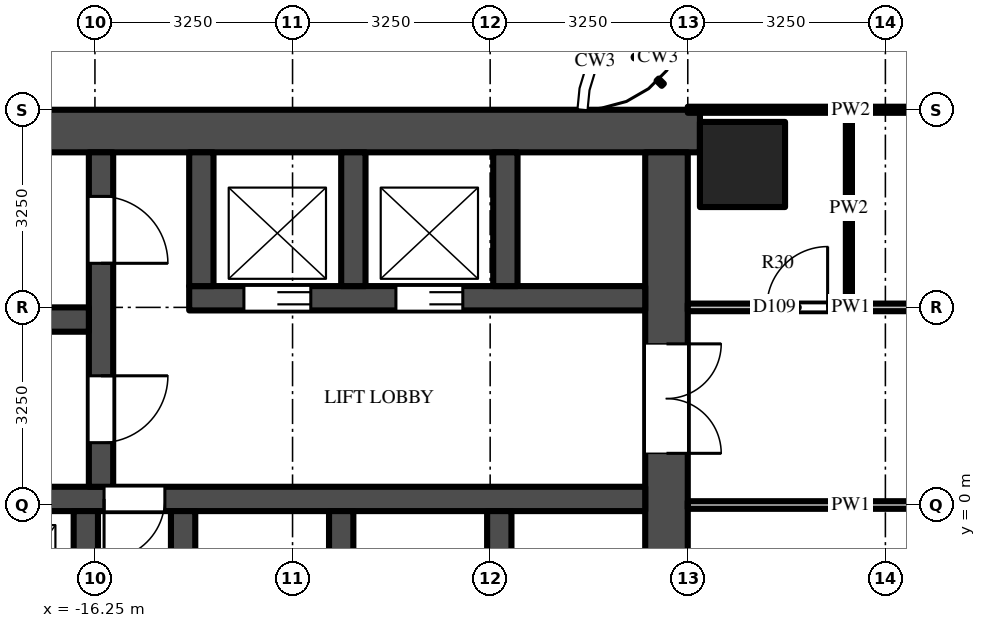
"""IFC4 building model, lengths in metres.
Left out: names, types, materials, properties, quantities, classifications, styles, units other than length and angle.
Written with IfcOpenShell. Run it as: python <this file> out.ifc"""

import sys

from ifc_helpers import new_model, si_unit, direction, frame, frame_2d, origin, origin_2d, place, context, subcontext, project, spatial, rectangle, extrude, source, transform, mapped, element, fill, save


model = new_model("IFC4")
c1 = context("Model", 3, precision=1e-05, world=origin(), true_north=direction((0.0, 1.0)))
c2 = subcontext(c1, "Body", "Model", "MODEL_VIEW")
j1 = project(units=[si_unit("LENGTHUNIT", "METRE"), si_unit("PLANEANGLEUNIT", "RADIAN")], contexts=[c1])
p1 = place(None, origin())
s1 = spatial("IfcSite", under=j1, at=p1, CompositionType="ELEMENT")
p2 = place(p1, origin())
s2 = spatial("IfcBuilding", under=s1, at=p2, CompositionType="ELEMENT")
p3 = place(p2, frame((0.0, 0.0, 70.0)))
s3 = spatial("IfcBuildingStorey", under=s2, at=p3, CompositionType="ELEMENT", Elevation=70.0)
m1 = source(origin(), c2, "Body", "SweptSolid", [
    extrude(rectangle(XDim=1.4, YDim=1.4, at=origin_2d()), origin(), (0.0, 0.0, 1.0), 4.5),
])
p4 = place(p3, frame((-5.6, 5.6, 0.0), z_axis=(0.0, 0.0, 1.0), x_axis=(1.0, 0.0, 0.0)))
e1 = element("IfcColumn", 1, at=p4, inside=s3, PredefinedType="COLUMN", context=c2, shape_type="MappedRepresentation", body=[
    mapped(m1, transform((0.0, 0.0, 0.0))),
])
m2 = source(origin(), c2, "Body", "SweptSolid", [
    extrude(rectangle(XDim=16.45, YDim=0.7, at=frame_2d((8.225, 0.0))), origin(), (0.0, 0.0, 1.0), 4.25),
])
p5 = place(p3, frame((-6.3, 6.15, 0.0), z_axis=(0.0, 0.0, 1.0), x_axis=(-1.0, 0.0, 0.0)))
e2 = element("IfcWall", 2, at=p5, inside=s3, PredefinedType="SHEAR", context=c2, shape_type="MappedRepresentation", body=[
    mapped(m2, transform((0.0, 0.0, 0.0))),
])
m3 = source(origin(), c2, "Body", "SweptSolid", [
    extrude(rectangle(XDim=9.05, YDim=0.7, at=frame_2d((4.525, 0.0))), origin(), (0.0, 0.0, 1.0), 4.25),
])
p6 = place(p3, frame((-6.85, 5.8, 0.0), z_axis=(0.0, 0.0, 1.0), x_axis=(0.0, -1.0, 0.0)))
e3 = element("IfcWall", 3, at=p6, inside=s3, PredefinedType="SHEAR", context=c2, shape_type="MappedRepresentation", body=[
    mapped(m3, transform((0.0, 0.0, 0.0))),
])
m4 = source(origin(), c2, "Body", "SweptSolid", [
    extrude(rectangle(XDim=1.8, YDim=2.1, at=frame_2d((0.9, 1.05))), frame((0.0, 0.36, 0.0), z_axis=(0.0, -1.0, 0.0), x_axis=(1.0, 0.0, 0.0)), (0.0, 0.0, 1.0), 0.72),
])
p7 = place(p6, frame((3.15, 0.0, 0.0)))
e4 = element("IfcOpeningElement", 4, at=p7, cuts=e3, PredefinedType="OPENING", context=c2, shape_type="MappedRepresentation", body=[
    mapped(m4, transform((0.0, 0.0, 0.0))),
])
m5 = source(origin(), c2, "Body", "SweptSolid", [
    extrude(rectangle(XDim=7.5, YDim=0.4, at=frame_2d((3.75, 0.0))), origin(), (0.0, 0.0, 1.0), 4.25),
])
p8 = place(p3, frame((-7.2, 3.4, 0.0), z_axis=(0.0, 0.0, 1.0), x_axis=(-1.0, 0.0, 0.0)))
e5 = element("IfcWall", 5, at=p8, inside=s3, PredefinedType="SHEAR", context=c2, shape_type="MappedRepresentation", body=[
    mapped(m5, transform((0.0, 0.0, 0.0))),
])
m6 = source(origin(), c2, "Body", "SweptSolid", [
    extrude(rectangle(XDim=1.1, YDim=2.1, at=frame_2d((0.55, 1.05))), frame((0.0, 0.21, 0.0), z_axis=(0.0, -1.0, 0.0), x_axis=(1.0, 0.0, 0.0)), (0.0, 0.0, 1.0), 0.42),
])
p9 = place(p8, frame((3.0, 0.0, 0.0)))
e6 = element("IfcOpeningElement", 6, at=p9, cuts=e5, PredefinedType="OPENING", context=c2, shape_type="MappedRepresentation", body=[
    mapped(m6, transform((0.0, 0.0, 0.0))),
])
p10 = place(p8, frame((5.5, 0.0, 0.0)))
e7 = element("IfcOpeningElement", 7, at=p10, cuts=e5, PredefinedType="OPENING", context=c2, shape_type="MappedRepresentation", body=[
    mapped(m6, transform((0.0, 0.0, 0.0))),
])
m7 = source(origin(), c2, "Body", "SweptSolid", [
    extrude(rectangle(XDim=14.85, YDim=0.4, at=frame_2d((7.425, 0.0))), origin(), (0.0, 0.0, 1.0), 4.25),
])
p11 = place(p3, frame((-7.2, 0.1, 0.0), z_axis=(0.0, 0.0, 1.0), x_axis=(-1.0, 0.0, 0.0)))
e8 = element("IfcWall", 8, at=p11, inside=s3, PredefinedType="SHEAR", context=c2, shape_type="MappedRepresentation", body=[
    mapped(m7, transform((0.0, 0.0, 0.0))),
])
m8 = source(origin(), c2, "Body", "SweptSolid", [
    extrude(rectangle(XDim=1.0, YDim=2.1, at=frame_2d((0.5, 1.05))), frame((0.0, 0.21, 0.0), z_axis=(0.0, -1.0, 0.0), x_axis=(1.0, 0.0, 0.0)), (0.0, 0.0, 1.0), 0.42),
])
p12 = place(p11, frame((7.9, 0.0, 0.0)))
e9 = element("IfcOpeningElement", 9, at=p12, cuts=e8, PredefinedType="OPENING", context=c2, shape_type="MappedRepresentation", body=[
    mapped(m8, transform((0.0, 0.0, 0.0))),
])
m9 = source(origin(), c2, "Body", "SweptSolid", [
    extrude(rectangle(XDim=5.5, YDim=0.4, at=frame_2d((2.75, 0.0))), origin(), (0.0, 0.0, 1.0), 4.25),
])
p13 = place(p3, frame((-16.15, 5.8, 0.0), z_axis=(0.0, 0.0, 1.0), x_axis=(0.0, -1.0, 0.0)))
e10 = element("IfcWall", 10, at=p13, inside=s3, PredefinedType="SHEAR", context=c2, shape_type="MappedRepresentation", body=[
    mapped(m9, transform((0.0, 0.0, 0.0))),
])
p14 = place(p13, frame((0.725, 0.0, 0.0)))
e11 = element("IfcOpeningElement", 11, at=p14, cuts=e10, PredefinedType="OPENING", context=c2, shape_type="MappedRepresentation", body=[
    mapped(m6, transform((0.0, 0.0, 0.0))),
])
p15 = place(p13, frame((3.675, 0.0, 0.0)))
e12 = element("IfcOpeningElement", 12, at=p15, cuts=e10, PredefinedType="OPENING", context=c2, shape_type="MappedRepresentation", body=[
    mapped(m6, transform((0.0, 0.0, 0.0))),
])
m10 = source(origin(), c2, "Body", "SweptSolid", [
    extrude(rectangle(XDim=5.7, YDim=0.4, at=frame_2d((2.85, 0.0))), origin(), (0.0, 0.0, 1.0), 4.25),
])
p16 = place(p3, frame((-16.35, 3.05, 0.0), z_axis=(0.0, 0.0, 1.0), x_axis=(-1.0, 0.0, 0.0)))
e13 = element("IfcWall", 13, at=p16, inside=s3, PredefinedType="SHEAR", context=c2, shape_type="MappedRepresentation", body=[
    mapped(m10, transform((0.0, 0.0, 0.0))),
])
m11 = source(origin(), c2, "Body", "SweptSolid", [
    extrude(rectangle(XDim=2.2, YDim=0.4, at=frame_2d((1.1, 0.0))), origin(), (0.0, 0.0, 1.0), 4.25),
])
for number, where, z_axis, x_axis in (
    (14, (-9.5, 5.8, 0.0), (0.0, 0.0, 1.0), (0.0, -1.0, 0.0)),
    (15, (-12.0, 5.8, 0.0), (0.0, 0.0, 1.0), (0.0, -1.0, 0.0)),
    (16, (-14.5, 5.8, 0.0), (0.0, 0.0, 1.0), (0.0, -1.0, 0.0)),
):
    element("IfcWall", number, at=place(p3, frame(where, z_axis=z_axis, x_axis=x_axis)), inside=s3, PredefinedType="SHEAR", context=c2, shape_type="MappedRepresentation", body=[
        mapped(m11, transform((0.0, 0.0, 0.0))),
    ])
m12 = source(origin(), c2, "Body", "SweptSolid", [
    extrude(rectangle(XDim=2.45, YDim=0.4, at=frame_2d((1.225, 0.0))), origin(), (0.0, 0.0, 1.0), 4.25),
])
for number, where, z_axis, x_axis in (
    (17, (-9.6, -0.1, 0.0), (0.0, 0.0, 1.0), (0.0, -1.0, 0.0)),
    (18, (-12.2, -0.1, 0.0), (0.0, 0.0, 1.0), (0.0, -1.0, 0.0)),
    (19, (-14.8, -0.1, 0.0), (0.0, 0.0, 1.0), (0.0, -1.0, 0.0)),
    (20, (-16.4, -0.1, 0.0), (0.0, 0.0, 1.0), (0.0, -1.0, 0.0)),
):
    element("IfcWall", number, at=place(p3, frame(where, z_axis=z_axis, x_axis=x_axis)), inside=s3, PredefinedType="SHEAR", context=c2, shape_type="MappedRepresentation", body=[
        mapped(m12, transform((0.0, 0.0, 0.0))),
    ])
m13 = source(origin(), c2, "Body", "SweptSolid", [
    extrude(rectangle(XDim=3.137, YDim=0.1, at=frame_2d((1.569, 0.0))), origin(), (0.0, 0.0, 1.0), 3.468),
])
p17 = place(p3, frame((-3.85, 3.312, 0.0), z_axis=(0.0, 0.0, 1.0), x_axis=(0.0, 1.0, 0.0)))
e21 = element("IfcWall", 21, at=p17, inside=s3, PredefinedType="PARTITIONING", context=c2, shape_type="MappedRepresentation", body=[
    mapped(m13, transform((0.0, 0.0, 0.0))),
])
m14 = source(origin(), c2, "Body", "SweptSolid", [
    extrude(rectangle(XDim=5.363, YDim=0.125, at=frame_2d((2.681, 0.0))), origin(), (0.0, 0.0, 1.0), 3.468),
])
p18 = place(p3, frame((-1.137, 0.0, 0.0), z_axis=(0.0, 0.0, 1.0), x_axis=(-1.0, 0.0, 0.0)))
e22 = element("IfcWall", 22, at=p18, inside=s3, PredefinedType="PARTITIONING", context=c2, shape_type="MappedRepresentation", body=[
    mapped(m14, transform((0.0, 0.0, 0.0))),
])
p19 = place(p3, frame((-6.5, 3.25, 0.0), z_axis=(0.0, 0.0, 1.0), x_axis=(1.0, 0.0, 0.0)))
e23 = element("IfcWall", 23, at=p19, inside=s3, PredefinedType="PARTITIONING", context=c2, shape_type="MappedRepresentation", body=[
    mapped(m14, transform((0.0, 0.0, 0.0))),
])
m15 = source(origin(), c2, "Body", "SweptSolid", [
    extrude(rectangle(XDim=1.0, YDim=2.1, at=frame_2d((0.5, 1.05))), frame((0.0, 0.073, 0.0), z_axis=(0.0, -1.0, 0.0), x_axis=(1.0, 0.0, 0.0)), (0.0, 0.0, 1.0), 0.145),
])
p20 = place(p19, frame((1.3, 0.0, 0.0)))
e24 = element("IfcOpeningElement", 24, at=p20, cuts=e23, PredefinedType="OPENING", context=c2, shape_type="MappedRepresentation", body=[
    mapped(m15, transform((0.0, 0.0, 0.0))),
])
m16 = source(origin(), c2, "Body", "SweptSolid", [
    extrude(rectangle(XDim=5.363, YDim=0.1, at=frame_2d((2.681, 0.0))), origin(), (0.0, 0.0, 1.0), 3.33),
])
p21 = place(p3, frame((-6.5, 6.5, 0.0), z_axis=(0.0, 0.0, 1.0), x_axis=(1.0, 0.0, 0.0)))
e25 = element("IfcWall", 25, at=p21, inside=s3, PredefinedType="PARTITIONING", context=c2, shape_type="MappedRepresentation", body=[
    mapped(m16, transform((0.0, 0.0, 0.0))),
])
m17 = source(origin(), c2, "Body", "SweptSolid", [
    extrude(rectangle(XDim=1.1, YDim=2.1, at=frame_2d((0.55, 1.05))), frame((0.0, 0.025, 0.0), z_axis=(0.0, -1.0, 0.0), x_axis=(1.0, 0.0, 0.0)), (0.0, 0.0, 1.0), 0.05),
])
p22 = place(p9, origin())
e26 = element("IfcDoor", 26, at=p22, inside=s3, OperationType="DOUBLE_DOOR_SLIDING", PredefinedType="DOOR", context=c2, shape_type="MappedRepresentation", body=[
    mapped(m17, transform((0.0, 0.0, 0.0))),
])
fill(e6, e26)
p23 = place(p10, origin())
e27 = element("IfcDoor", 27, at=p23, inside=s3, OperationType="DOUBLE_DOOR_SLIDING", PredefinedType="DOOR", context=c2, shape_type="MappedRepresentation", body=[
    mapped(m17, transform((0.0, 0.0, 0.0))),
])
fill(e7, e27)
m18 = source(origin(), c2, "Body", "SweptSolid", [
    extrude(rectangle(XDim=1.8, YDim=2.1, at=frame_2d((0.9, 1.05))), frame((0.0, -0.275, 0.0), z_axis=(0.0, -1.0, 0.0), x_axis=(1.0, 0.0, 0.0)), (0.0, 0.0, 1.0), 0.05),
])
p24 = place(p7, origin())
e28 = element("IfcDoor", 28, at=p24, inside=s3, OperationType="DOUBLE_DOOR_SINGLE_SWING", PredefinedType="DOOR", context=c2, shape_type="MappedRepresentation", body=[
    mapped(m18, transform((0.0, 0.0, 0.0))),
])
fill(e4, e28)
p25 = place(p14, origin())
e29 = element("IfcDoor", 29, at=p25, inside=s3, OperationType="SINGLE_SWING_RIGHT", PredefinedType="DOOR", context=c2, shape_type="MappedRepresentation", body=[
    mapped(m17, transform((0.0, 0.0, 0.0))),
])
fill(e11, e29)
p26 = place(p15, origin())
e30 = element("IfcDoor", 30, at=p26, inside=s3, OperationType="SINGLE_SWING_LEFT", PredefinedType="DOOR", context=c2, shape_type="MappedRepresentation", body=[
    mapped(m17, transform((0.0, 0.0, 0.0))),
])
fill(e12, e30)
m19 = source(origin(), c2, "Body", "SweptSolid", [
    extrude(rectangle(XDim=1.0, YDim=2.1, at=frame_2d((0.5, 1.05))), frame((0.0, 0.025, 0.0), z_axis=(0.0, -1.0, 0.0), x_axis=(1.0, 0.0, 0.0)), (0.0, 0.0, 1.0), 0.05),
])
p27 = place(p12, origin())
e31 = element("IfcDoor", 31, at=p27, inside=s3, OperationType="SINGLE_SWING_RIGHT", PredefinedType="DOOR", context=c2, shape_type="MappedRepresentation", body=[
    mapped(m19, transform((0.0, 0.0, 0.0))),
])
fill(e9, e31)
p28 = place(p20, origin())
e32 = element("IfcDoor", 32, at=p28, inside=s3, OperationType="SINGLE_SWING_RIGHT", PredefinedType="DOOR", context=c2, shape_type="MappedRepresentation", body=[
    mapped(m19, transform((0.0, 0.0, 0.0))),
])
fill(e24, e32)
save(model, sys.argv[1])
